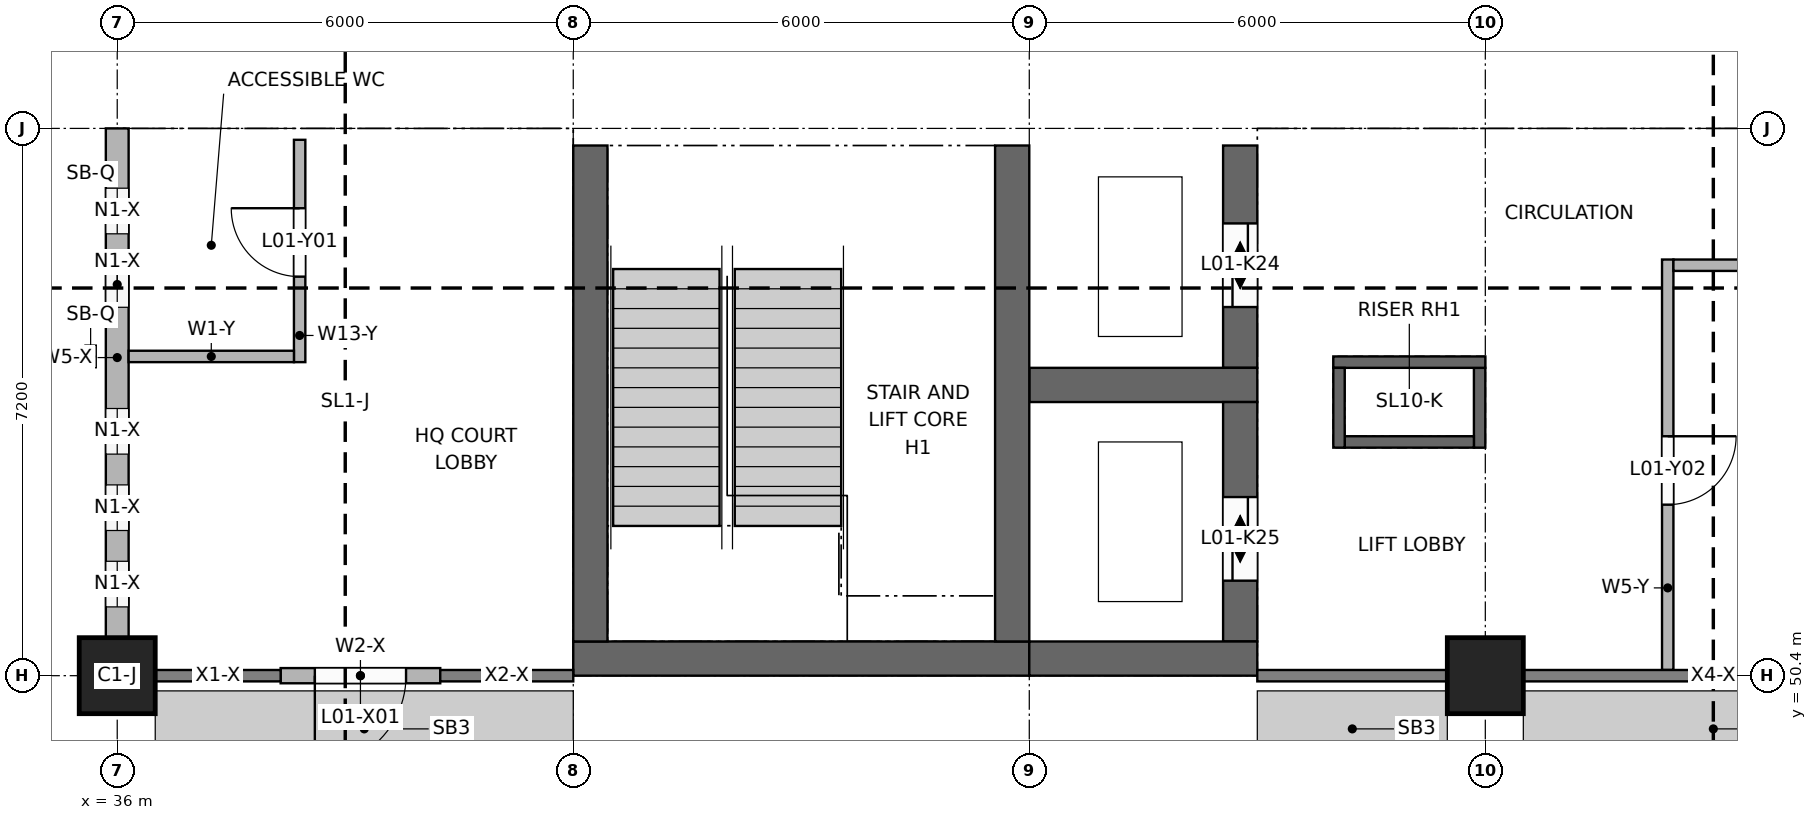
"""IFC4 building model, lengths in metres.
Left out: names, types, materials, properties, quantities, classifications, styles, units other than length and angle.
Written with IfcOpenShell. Run it as: python <this file> out.ifc"""

import sys

from ifc_helpers import new_model, si_unit, direction, frame, frame_2d, origin, origin_2d, place, context, subcontext, project, spatial, rectangle, extrude, element, fill, save


model = new_model("IFC4")
c1 = context("Model", 3, precision=1e-05, world=origin(), true_north=direction((0.0, 1.0)))
c2 = subcontext(c1, "Body", "Model", "MODEL_VIEW")
j1 = project(units=[si_unit("LENGTHUNIT", "METRE"), si_unit("PLANEANGLEUNIT", "RADIAN")], contexts=[c1])
p1 = place(None, origin())
s1 = spatial("IfcSite", under=j1, at=p1, CompositionType="ELEMENT")
p2 = place(p1, origin())
s2 = spatial("IfcBuilding", under=s1, at=p2, CompositionType="ELEMENT")
p3 = place(p2, frame((0.0, 0.0, 4.2)))
s3 = spatial("IfcBuildingStorey", under=s2, at=p3, CompositionType="ELEMENT", Elevation=4.2)
p4 = place(p3, frame((42.0, 50.625, 0.0), z_axis=(0.0, 0.0, 1.0), x_axis=(1.0, 0.0, 0.0)))
e1 = element("IfcWall", 1, at=p4, inside=s3, PredefinedType="SHEAR", context=c2, shape_type="SweptSolid", body=[
    extrude(rectangle(XDim=6.0, YDim=0.45, at=frame_2d((3.0, 0.0))), origin(), (0.0, 0.0, 1.0), 3.95),
])
p5 = place(p4, frame((3.8, 0.0, 0.0)))
e2 = element("IfcOpeningElement", 2, at=p5, cuts=e1, PredefinedType="OPENING", context=c2, shape_type="SweptSolid", body=[
    extrude(rectangle(XDim=1.4, YDim=2.1, at=frame_2d((0.7, 1.05))), frame((0.0, 0.235, 0.0), z_axis=(0.0, -1.0, 0.0), x_axis=(1.0, 0.0, 0.0)), (0.0, 0.0, 1.0), 0.47),
])
p6 = place(p3, frame((42.225, 50.85, 0.0), z_axis=(0.0, 0.0, 1.0), x_axis=(0.0, 1.0, 0.0)))
e3 = element("IfcWall", 3, at=p6, inside=s3, PredefinedType="SHEAR", context=c2, shape_type="SweptSolid", body=[
    extrude(rectangle(XDim=6.525, YDim=0.45, at=frame_2d((3.262, 0.0))), origin(), (0.0, 0.0, 1.0), 3.95),
])
p7 = place(p6, frame((4.9, 0.0, 0.0)))
e4 = element("IfcOpeningElement", 4, at=p7, cuts=e3, PredefinedType="OPENING", context=c2, shape_type="SweptSolid", body=[
    extrude(rectangle(XDim=1.2, YDim=2.1, at=frame_2d((0.6, 1.05))), frame((0.0, 0.235, 0.0), z_axis=(0.0, -1.0, 0.0), x_axis=(1.0, 0.0, 0.0)), (0.0, 0.0, 1.0), 0.47),
])
p8 = place(p3, frame((47.775, 50.85, 0.0), z_axis=(0.0, 0.0, 1.0), x_axis=(0.0, 1.0, 0.0)))
e5 = element("IfcWall", 5, at=p8, inside=s3, PredefinedType="SHEAR", context=c2, shape_type="SweptSolid", body=[
    extrude(rectangle(XDim=6.525, YDim=0.45, at=frame_2d((3.262, 0.0))), origin(), (0.0, 0.0, 1.0), 3.95),
])
p9 = place(p3, frame((48.0, 54.225, 0.0), z_axis=(0.0, 0.0, 1.0), x_axis=(1.0, 0.0, 0.0)))
e6 = element("IfcWall", 6, at=p9, inside=s3, PredefinedType="SHEAR", context=c2, shape_type="SweptSolid", body=[
    extrude(rectangle(XDim=3.0, YDim=0.45, at=frame_2d((1.5, 0.0))), origin(), (0.0, 0.0, 1.0), 4.2),
])
p10 = place(p3, frame((50.775, 54.45, 0.0), z_axis=(0.0, 0.0, 1.0), x_axis=(0.0, 1.0, 0.0)))
e7 = element("IfcWall", 7, at=p10, inside=s3, PredefinedType="SHEAR", context=c2, shape_type="SweptSolid", body=[
    extrude(rectangle(XDim=2.925, YDim=0.45, at=frame_2d((1.462, 0.0))), origin(), (0.0, 0.0, 1.0), 4.2),
])
p11 = place(p10, frame((0.8, 0.0, 0.0)))
e8 = element("IfcOpeningElement", 8, at=p11, cuts=e7, PredefinedType="OPENING", context=c2, shape_type="SweptSolid", body=[
    extrude(rectangle(XDim=1.1, YDim=2.1, at=frame_2d((0.55, 1.05))), frame((0.0, 0.235, 0.0), z_axis=(0.0, -1.0, 0.0), x_axis=(1.0, 0.0, 0.0)), (0.0, 0.0, 1.0), 0.47),
])
p12 = place(p3, frame((48.0, 50.625, 0.0), z_axis=(0.0, 0.0, 1.0), x_axis=(1.0, 0.0, 0.0)))
e9 = element("IfcWall", 9, at=p12, inside=s3, PredefinedType="SHEAR", context=c2, shape_type="SweptSolid", body=[
    extrude(rectangle(XDim=3.0, YDim=0.45, at=frame_2d((1.5, 0.0))), origin(), (0.0, 0.0, 1.0), 4.2),
])
p13 = place(p3, frame((50.775, 50.85, 0.0), z_axis=(0.0, 0.0, 1.0), x_axis=(0.0, 1.0, 0.0)))
e10 = element("IfcWall", 10, at=p13, inside=s3, PredefinedType="SHEAR", context=c2, shape_type="SweptSolid", body=[
    extrude(rectangle(XDim=3.15, YDim=0.45, at=frame_2d((1.575, 0.0))), origin(), (0.0, 0.0, 1.0), 4.2),
])
p14 = place(p13, frame((0.8, 0.0, 0.0)))
e11 = element("IfcOpeningElement", 11, at=p14, cuts=e10, PredefinedType="OPENING", context=c2, shape_type="SweptSolid", body=[
    extrude(rectangle(XDim=1.1, YDim=2.1, at=frame_2d((0.55, 1.05))), frame((0.0, 0.235, 0.0), z_axis=(0.0, -1.0, 0.0), x_axis=(1.0, 0.0, 0.0)), (0.0, 0.0, 1.0), 0.47),
])
p15 = place(p3, frame((42.0, 50.625, -0.2), z_axis=(0.0, 0.0, 1.0), x_axis=(1.0, 0.0, 0.0)))
e12 = element("IfcWall", 12, at=p15, inside=s3, PredefinedType="SOLIDWALL", context=c2, shape_type="SweptSolid", body=[
    extrude(rectangle(XDim=6.0, YDim=0.45, at=frame_2d((3.0, 0.0))), origin(), (0.0, 0.0, 1.0), 0.2),
])
p16 = place(p3, frame((42.225, 50.85, -0.2), z_axis=(0.0, 0.0, 1.0), x_axis=(0.0, 1.0, 0.0)))
e13 = element("IfcWall", 13, at=p16, inside=s3, PredefinedType="SOLIDWALL", context=c2, shape_type="SweptSolid", body=[
    extrude(rectangle(XDim=6.525, YDim=0.45, at=frame_2d((3.262, 0.0))), origin(), (0.0, 0.0, 1.0), 0.2),
])
p17 = place(p3, frame((52.0, 53.475, 0.0), z_axis=(0.0, 0.0, 1.0), x_axis=(1.0, 0.0, 0.0)))
e14 = element("IfcWall", 14, at=p17, inside=s3, PredefinedType="SOLIDWALL", context=c2, shape_type="SweptSolid", body=[
    extrude(rectangle(XDim=2.0, YDim=0.15, at=frame_2d((1.0, 0.0))), origin(), (0.0, 0.0, 1.0), 4.2),
])
p18 = place(p3, frame((52.0, 54.525, 0.0), z_axis=(0.0, 0.0, 1.0), x_axis=(1.0, 0.0, 0.0)))
e15 = element("IfcWall", 15, at=p18, inside=s3, PredefinedType="SOLIDWALL", context=c2, shape_type="SweptSolid", body=[
    extrude(rectangle(XDim=2.0, YDim=0.15, at=frame_2d((1.0, 0.0))), origin(), (0.0, 0.0, 1.0), 4.2),
])
p19 = place(p18, frame((0.6, 0.0, 0.0)))
e16 = element("IfcOpeningElement", 16, at=p19, cuts=e15, PredefinedType="OPENING", context=c2, shape_type="SweptSolid", body=[
    extrude(rectangle(XDim=0.8, YDim=2.1, at=frame_2d((0.4, 1.05))), frame((0.0, 0.085, 0.0), z_axis=(0.0, -1.0, 0.0), x_axis=(1.0, 0.0, 0.0)), (0.0, 0.0, 1.0), 0.17),
])
p20 = place(p3, frame((52.075, 53.55, 0.0), z_axis=(0.0, 0.0, 1.0), x_axis=(0.0, 1.0, 0.0)))
e17 = element("IfcWall", 17, at=p20, inside=s3, PredefinedType="SOLIDWALL", context=c2, shape_type="SweptSolid", body=[
    extrude(rectangle(XDim=0.9, YDim=0.15, at=frame_2d((0.45, 0.0))), origin(), (0.0, 0.0, 1.0), 4.2),
])
p21 = place(p3, frame((53.925, 53.55, 0.0), z_axis=(0.0, 0.0, 1.0), x_axis=(0.0, 1.0, 0.0)))
e18 = element("IfcWall", 18, at=p21, inside=s3, PredefinedType="SOLIDWALL", context=c2, shape_type="SweptSolid", body=[
    extrude(rectangle(XDim=0.9, YDim=0.15, at=frame_2d((0.45, 0.0))), origin(), (0.0, 0.0, 1.0), 3.05),
])
p22 = place(p3, frame((52.15, 53.475, -0.2), z_axis=(0.0, 0.0, 1.0), x_axis=(1.0, 0.0, 0.0)))
e19 = element("IfcWall", 19, at=p22, inside=s3, PredefinedType="SOLIDWALL", context=c2, shape_type="SweptSolid", body=[
    extrude(rectangle(XDim=1.7, YDim=0.15, at=frame_2d((0.85, 0.0))), origin(), (0.0, 0.0, 1.0), 0.2),
])
p23 = place(p3, frame((52.0, 54.525, -0.2), z_axis=(0.0, 0.0, 1.0), x_axis=(1.0, 0.0, 0.0)))
e20 = element("IfcWall", 20, at=p23, inside=s3, PredefinedType="SOLIDWALL", context=c2, shape_type="SweptSolid", body=[
    extrude(rectangle(XDim=2.0, YDim=0.15, at=frame_2d((1.0, 0.0))), origin(), (0.0, 0.0, 1.0), 0.2),
])
for number, where, z_axis, x_axis in (
    (21, (52.075, 53.4, -0.2), (0.0, 0.0, 1.0), (0.0, 1.0, 0.0)),
    (22, (53.925, 53.4, -0.2), (0.0, 0.0, 1.0), (0.0, 1.0, 0.0)),
):
    element("IfcWall", number, at=place(p3, frame(where, z_axis=z_axis, x_axis=x_axis)), inside=s3, PredefinedType="SOLIDWALL", context=c2, shape_type="SweptSolid", body=[
        extrude(rectangle(XDim=1.05, YDim=0.15, at=frame_2d((0.525, 0.0))), origin(), (0.0, 0.0, 1.0), 0.2),
    ])
for number, where, z_axis, x_axis in (
    (23, (36.0, 50.4, 0.0), (0.0, 0.0, 1.0), (1.0, 0.0, 0.0)),
    (24, (54.0, 50.4, 0.0), (0.0, 0.0, 1.0), (1.0, 0.0, 0.0)),
):
    element("IfcColumn", number, at=place(p3, frame(where, z_axis=z_axis, x_axis=x_axis)), inside=s3, PredefinedType="COLUMN", context=c2, shape_type="SweptSolid", body=[
        extrude(rectangle(XDim=1.0, YDim=1.0, at=origin_2d()), origin(), (0.0, 0.0, 1.0), 3.95),
    ])
p24 = place(p3, frame((30.0, 57.6, -0.25), z_axis=(0.0, 0.0, 1.0), x_axis=(1.0, 0.0, 0.0)))
e25 = element("IfcWall", 25, at=p24, inside=s3, PredefinedType="SOLIDWALL", context=c2, shape_type="SweptSolid", body=[
    extrude(rectangle(XDim=6.0, YDim=0.45, at=frame_2d((3.0, 0.0))), origin(), (0.0, 0.0, 1.0), 4.25),
])
p25 = place(p3, frame((36.0, 57.6, -0.25), z_axis=(0.0, 0.0, 1.0), x_axis=(1.0, 0.0, 0.0)))
e26 = element("IfcWall", 26, at=p25, inside=s3, PredefinedType="SOLIDWALL", context=c2, shape_type="SweptSolid", body=[
    extrude(rectangle(XDim=12.0, YDim=0.45, at=frame_2d((6.0, 0.0))), origin(), (0.0, 0.0, 1.0), 4.2),
])
p26 = place(p3, frame((48.0, 57.6, 0.0), z_axis=(0.0, 0.0, 1.0), x_axis=(1.0, 0.0, 0.0)))
e27 = element("IfcWall", 27, at=p26, inside=s3, PredefinedType="SOLIDWALL", context=c2, shape_type="SweptSolid", body=[
    extrude(rectangle(XDim=3.0, YDim=0.45, at=frame_2d((1.5, 0.0))), origin(), (0.0, 0.0, 1.0), 3.95),
])
p27 = place(p3, frame((51.0, 57.6, -0.25), z_axis=(0.0, 0.0, 1.0), x_axis=(1.0, 0.0, 0.0)))
e28 = element("IfcWall", 28, at=p27, inside=s3, PredefinedType="SOLIDWALL", context=c2, shape_type="SweptSolid", body=[
    extrude(rectangle(XDim=33.0, YDim=0.45, at=frame_2d((16.5, 0.0))), origin(), (0.0, 0.0, 1.0), 4.2),
])
p28 = place(p3, frame((38.15, 50.4, 0.0), z_axis=(0.0, 0.0, 1.0), x_axis=(1.0, 0.0, 0.0)))
e29 = element("IfcWall", 29, at=p28, inside=s3, PredefinedType="SOLIDWALL", context=c2, shape_type="SweptSolid", body=[
    extrude(rectangle(XDim=2.1, YDim=0.2, at=frame_2d((1.05, 0.0))), origin(), (0.0, 0.0, 1.0), 3.15),
])
p29 = place(p28, frame((0.45, 0.0, 0.0)))
e30 = element("IfcOpeningElement", 30, at=p29, cuts=e29, PredefinedType="OPENING", context=c2, shape_type="SweptSolid", body=[
    extrude(rectangle(XDim=1.2, YDim=2.4, at=frame_2d((0.6, 1.2))), frame((0.0, 0.11, 0.0), z_axis=(0.0, -1.0, 0.0), x_axis=(1.0, 0.0, 0.0)), (0.0, 0.0, 1.0), 0.22),
])
p30 = place(p3, frame((36.0, 50.9, 0.0), z_axis=(0.0, 0.0, 1.0), x_axis=(0.0, 1.0, 0.0)))
e31 = element("IfcWall", 31, at=p30, inside=s3, PredefinedType="SOLIDWALL", context=c2, shape_type="SweptSolid", body=[
    extrude(rectangle(XDim=6.7, YDim=0.3, at=frame_2d((3.35, 0.0))), origin(), (0.0, 0.0, 1.0), 3.05),
])
p31 = place(p30, frame((0.405, 0.0, 0.9)))
e32 = element("IfcOpeningElement", 32, at=p31, cuts=e31, PredefinedType="OPENING", context=c2, shape_type="SweptSolid", body=[
    extrude(rectangle(XDim=0.6, YDim=1.9, at=frame_2d((0.3, 0.95))), frame((0.0, 0.16, 0.0), z_axis=(0.0, -1.0, 0.0), x_axis=(1.0, 0.0, 0.0)), (0.0, 0.0, 1.0), 0.32),
])
p32 = place(p30, frame((1.41, 0.0, 0.9)))
e33 = element("IfcOpeningElement", 33, at=p32, cuts=e31, PredefinedType="OPENING", context=c2, shape_type="SweptSolid", body=[
    extrude(rectangle(XDim=0.6, YDim=1.9, at=frame_2d((0.3, 0.95))), frame((0.0, 0.16, 0.0), z_axis=(0.0, -1.0, 0.0), x_axis=(1.0, 0.0, 0.0)), (0.0, 0.0, 1.0), 0.32),
])
p33 = place(p30, frame((2.415, 0.0, 0.9)))
e34 = element("IfcOpeningElement", 34, at=p33, cuts=e31, PredefinedType="OPENING", context=c2, shape_type="SweptSolid", body=[
    extrude(rectangle(XDim=0.6, YDim=1.9, at=frame_2d((0.3, 0.95))), frame((0.0, 0.16, 0.0), z_axis=(0.0, -1.0, 0.0), x_axis=(1.0, 0.0, 0.0)), (0.0, 0.0, 1.0), 0.32),
])
p34 = place(p30, frame((4.347, 0.0, 0.9)))
e35 = element("IfcOpeningElement", 35, at=p34, cuts=e31, PredefinedType="OPENING", context=c2, shape_type="SweptSolid", body=[
    extrude(rectangle(XDim=0.6, YDim=1.9, at=frame_2d((0.3, 0.95))), frame((0.0, 0.16, 0.0), z_axis=(0.0, -1.0, 0.0), x_axis=(1.0, 0.0, 0.0)), (0.0, 0.0, 1.0), 0.32),
])
p35 = place(p30, frame((5.313, 0.0, 0.9)))
e36 = element("IfcOpeningElement", 36, at=p35, cuts=e31, PredefinedType="OPENING", context=c2, shape_type="SweptSolid", body=[
    extrude(rectangle(XDim=0.6, YDim=1.9, at=frame_2d((0.3, 0.95))), frame((0.0, 0.16, 0.0), z_axis=(0.0, -1.0, 0.0), x_axis=(1.0, 0.0, 0.0)), (0.0, 0.0, 1.0), 0.32),
])
p36 = place(p3, frame((38.4, 54.525, 0.0), z_axis=(0.0, 0.0, 1.0), x_axis=(0.0, 1.0, 0.0)))
e37 = element("IfcWall", 37, at=p36, inside=s3, PredefinedType="PARTITIONING", context=c2, shape_type="SweptSolid", body=[
    extrude(rectangle(XDim=2.925, YDim=0.15, at=frame_2d((1.462, 0.0))), origin(), (0.0, 0.0, 1.0), 3.95),
])
p37 = place(p36, frame((1.125, 0.0, 0.0)))
e38 = element("IfcOpeningElement", 38, at=p37, cuts=e37, PredefinedType="OPENING", context=c2, shape_type="SweptSolid", body=[
    extrude(rectangle(XDim=0.9, YDim=2.1, at=frame_2d((0.45, 1.05))), frame((0.0, 0.085, 0.0), z_axis=(0.0, -1.0, 0.0), x_axis=(1.0, 0.0, 0.0)), (0.0, 0.0, 1.0), 0.17),
])
p38 = place(p3, frame((56.4, 50.475, 0.0), z_axis=(0.0, 0.0, 1.0), x_axis=(0.0, 1.0, 0.0)))
e39 = element("IfcWall", 39, at=p38, inside=s3, PredefinedType="PARTITIONING", context=c2, shape_type="SweptSolid", body=[
    extrude(rectangle(XDim=5.4, YDim=0.15, at=frame_2d((2.7, 0.0))), origin(), (0.0, 0.0, 1.0), 3.15),
])
p39 = place(p38, frame((2.175, 0.0, 0.0)))
e40 = element("IfcOpeningElement", 40, at=p39, cuts=e39, PredefinedType="OPENING", context=c2, shape_type="SweptSolid", body=[
    extrude(rectangle(XDim=0.9, YDim=2.1, at=frame_2d((0.45, 1.05))), frame((0.0, 0.085, 0.0), z_axis=(0.0, -1.0, 0.0), x_axis=(1.0, 0.0, 0.0)), (0.0, 0.0, 1.0), 0.17),
])
p40 = place(p3, frame((36.15, 54.6, 0.0), z_axis=(0.0, 0.0, 1.0), x_axis=(1.0, 0.0, 0.0)))
e41 = element("IfcWall", 41, at=p40, inside=s3, PredefinedType="PARTITIONING", context=c2, shape_type="SweptSolid", body=[
    extrude(rectangle(XDim=2.175, YDim=0.15, at=frame_2d((1.087, 0.0))), origin(), (0.0, 0.0, 1.0), 3.05),
])
p41 = place(p3, frame((56.475, 55.8, 0.0), z_axis=(0.0, 0.0, 1.0), x_axis=(1.0, 0.0, 0.0)))
e42 = element("IfcWall", 42, at=p41, inside=s3, PredefinedType="PARTITIONING", context=c2, shape_type="SweptSolid", body=[
    extrude(rectangle(XDim=3.425, YDim=0.15, at=frame_2d((1.712, 0.0))), origin(), (0.0, 0.0, 1.0), 3.05),
])
p42 = place(p29, frame((1.2, 0.0, 0.0), z_axis=(0.0, 0.0, 1.0), x_axis=(-1.0, 0.0, 0.0)))
e43 = element("IfcDoor", 43, at=p42, inside=s3, OperationType="SINGLE_SWING_RIGHT", PredefinedType="DOOR", context=c2, shape_type="SweptSolid", body=[
    extrude(rectangle(XDim=1.2, YDim=2.4, at=frame_2d((0.6, 1.2))), frame((0.0, 0.025, 0.0), z_axis=(0.0, -1.0, 0.0), x_axis=(1.0, 0.0, 0.0)), (0.0, 0.0, 1.0), 0.05),
])
fill(e30, e43)
p43 = place(p31, origin())
e44 = element("IfcWindow", 44, at=p43, inside=s3, PartitioningType="SINGLE_PANEL", PredefinedType="WINDOW", context=c2, shape_type="SweptSolid", body=[
    extrude(rectangle(XDim=0.6, YDim=1.9, at=frame_2d((0.3, 0.95))), frame((0.0, 0.03, 0.0), z_axis=(0.0, -1.0, 0.0), x_axis=(1.0, 0.0, 0.0)), (0.0, 0.0, 1.0), 0.06),
])
fill(e32, e44)
p44 = place(p32, origin())
e45 = element("IfcWindow", 45, at=p44, inside=s3, PartitioningType="SINGLE_PANEL", PredefinedType="WINDOW", context=c2, shape_type="SweptSolid", body=[
    extrude(rectangle(XDim=0.6, YDim=1.9, at=frame_2d((0.3, 0.95))), frame((0.0, 0.03, 0.0), z_axis=(0.0, -1.0, 0.0), x_axis=(1.0, 0.0, 0.0)), (0.0, 0.0, 1.0), 0.06),
])
fill(e33, e45)
p45 = place(p33, origin())
e46 = element("IfcWindow", 46, at=p45, inside=s3, PartitioningType="SINGLE_PANEL", PredefinedType="WINDOW", context=c2, shape_type="SweptSolid", body=[
    extrude(rectangle(XDim=0.6, YDim=1.9, at=frame_2d((0.3, 0.95))), frame((0.0, 0.03, 0.0), z_axis=(0.0, -1.0, 0.0), x_axis=(1.0, 0.0, 0.0)), (0.0, 0.0, 1.0), 0.06),
])
fill(e34, e46)
p46 = place(p34, origin())
e47 = element("IfcWindow", 47, at=p46, inside=s3, PartitioningType="SINGLE_PANEL", PredefinedType="WINDOW", context=c2, shape_type="SweptSolid", body=[
    extrude(rectangle(XDim=0.6, YDim=1.9, at=frame_2d((0.3, 0.95))), frame((0.0, 0.03, 0.0), z_axis=(0.0, -1.0, 0.0), x_axis=(1.0, 0.0, 0.0)), (0.0, 0.0, 1.0), 0.06),
])
fill(e35, e47)
p47 = place(p35, origin())
e48 = element("IfcWindow", 48, at=p47, inside=s3, PartitioningType="SINGLE_PANEL", PredefinedType="WINDOW", context=c2, shape_type="SweptSolid", body=[
    extrude(rectangle(XDim=0.6, YDim=1.9, at=frame_2d((0.3, 0.95))), frame((0.0, 0.03, 0.0), z_axis=(0.0, -1.0, 0.0), x_axis=(1.0, 0.0, 0.0)), (0.0, 0.0, 1.0), 0.06),
])
fill(e36, e48)
p48 = place(p7, frame((1.2, 0.0, 0.0), z_axis=(0.0, 0.0, 1.0), x_axis=(-1.0, 0.0, 0.0)))
e49 = element("IfcDoor", 49, at=p48, inside=s3, OperationType="SINGLE_SWING_LEFT", PredefinedType="DOOR", context=c2, shape_type="SweptSolid", body=[
    extrude(rectangle(XDim=1.2, YDim=2.1, at=frame_2d((0.6, 1.05))), frame((0.0, 0.025, 0.0), z_axis=(0.0, -1.0, 0.0), x_axis=(1.0, 0.0, 0.0)), (0.0, 0.0, 1.0), 0.05),
])
fill(e4, e49)
p49 = place(p5, frame((1.4, 0.0, 0.0), z_axis=(0.0, 0.0, 1.0), x_axis=(-1.0, 0.0, 0.0)))
e50 = element("IfcDoor", 50, at=p49, inside=s3, OperationType="DOUBLE_DOOR_SINGLE_SWING", PredefinedType="DOOR", context=c2, shape_type="SweptSolid", body=[
    extrude(rectangle(XDim=1.4, YDim=2.1, at=frame_2d((0.7, 1.05))), frame((0.0, 0.025, 0.0), z_axis=(0.0, -1.0, 0.0), x_axis=(1.0, 0.0, 0.0)), (0.0, 0.0, 1.0), 0.05),
])
fill(e2, e50)
p50 = place(p11, origin())
e51 = element("IfcDoor", 51, at=p50, inside=s3, OperationType="DOUBLE_DOOR_SLIDING", PredefinedType="DOOR", context=c2, shape_type="SweptSolid", body=[
    extrude(rectangle(XDim=1.1, YDim=2.1, at=frame_2d((0.55, 1.05))), frame((0.0, 0.025, 0.0), z_axis=(0.0, -1.0, 0.0), x_axis=(1.0, 0.0, 0.0)), (0.0, 0.0, 1.0), 0.05),
])
fill(e8, e51)
p51 = place(p14, origin())
e52 = element("IfcDoor", 52, at=p51, inside=s3, OperationType="DOUBLE_DOOR_SLIDING", PredefinedType="DOOR", context=c2, shape_type="SweptSolid", body=[
    extrude(rectangle(XDim=1.1, YDim=2.1, at=frame_2d((0.55, 1.05))), frame((0.0, 0.025, 0.0), z_axis=(0.0, -1.0, 0.0), x_axis=(1.0, 0.0, 0.0)), (0.0, 0.0, 1.0), 0.05),
])
fill(e11, e52)
p52 = place(p19, origin())
e53 = element("IfcDoor", 53, at=p52, inside=s3, OperationType="SINGLE_SWING_LEFT", PredefinedType="DOOR", context=c2, shape_type="SweptSolid", body=[
    extrude(rectangle(XDim=0.8, YDim=2.1, at=frame_2d((0.4, 1.05))), frame((0.0, 0.025, 0.0), z_axis=(0.0, -1.0, 0.0), x_axis=(1.0, 0.0, 0.0)), (0.0, 0.0, 1.0), 0.05),
])
fill(e16, e53)
p53 = place(p37, origin())
e54 = element("IfcDoor", 54, at=p53, inside=s3, OperationType="SINGLE_SWING_RIGHT", PredefinedType="DOOR", context=c2, shape_type="SweptSolid", body=[
    extrude(rectangle(XDim=0.9, YDim=2.1, at=frame_2d((0.45, 1.05))), frame((0.0, 0.025, 0.0), z_axis=(0.0, -1.0, 0.0), x_axis=(1.0, 0.0, 0.0)), (0.0, 0.0, 1.0), 0.05),
])
fill(e38, e54)
p54 = place(p39, frame((0.9, 0.0, 0.0), z_axis=(0.0, 0.0, 1.0), x_axis=(-1.0, 0.0, 0.0)))
e55 = element("IfcDoor", 55, at=p54, inside=s3, OperationType="SINGLE_SWING_LEFT", PredefinedType="DOOR", context=c2, shape_type="SweptSolid", body=[
    extrude(rectangle(XDim=0.9, YDim=2.1, at=frame_2d((0.45, 1.05))), frame((0.0, 0.025, 0.0), z_axis=(0.0, -1.0, 0.0), x_axis=(1.0, 0.0, 0.0)), (0.0, 0.0, 1.0), 0.05),
])
fill(e40, e55)
save(model, sys.argv[1])
